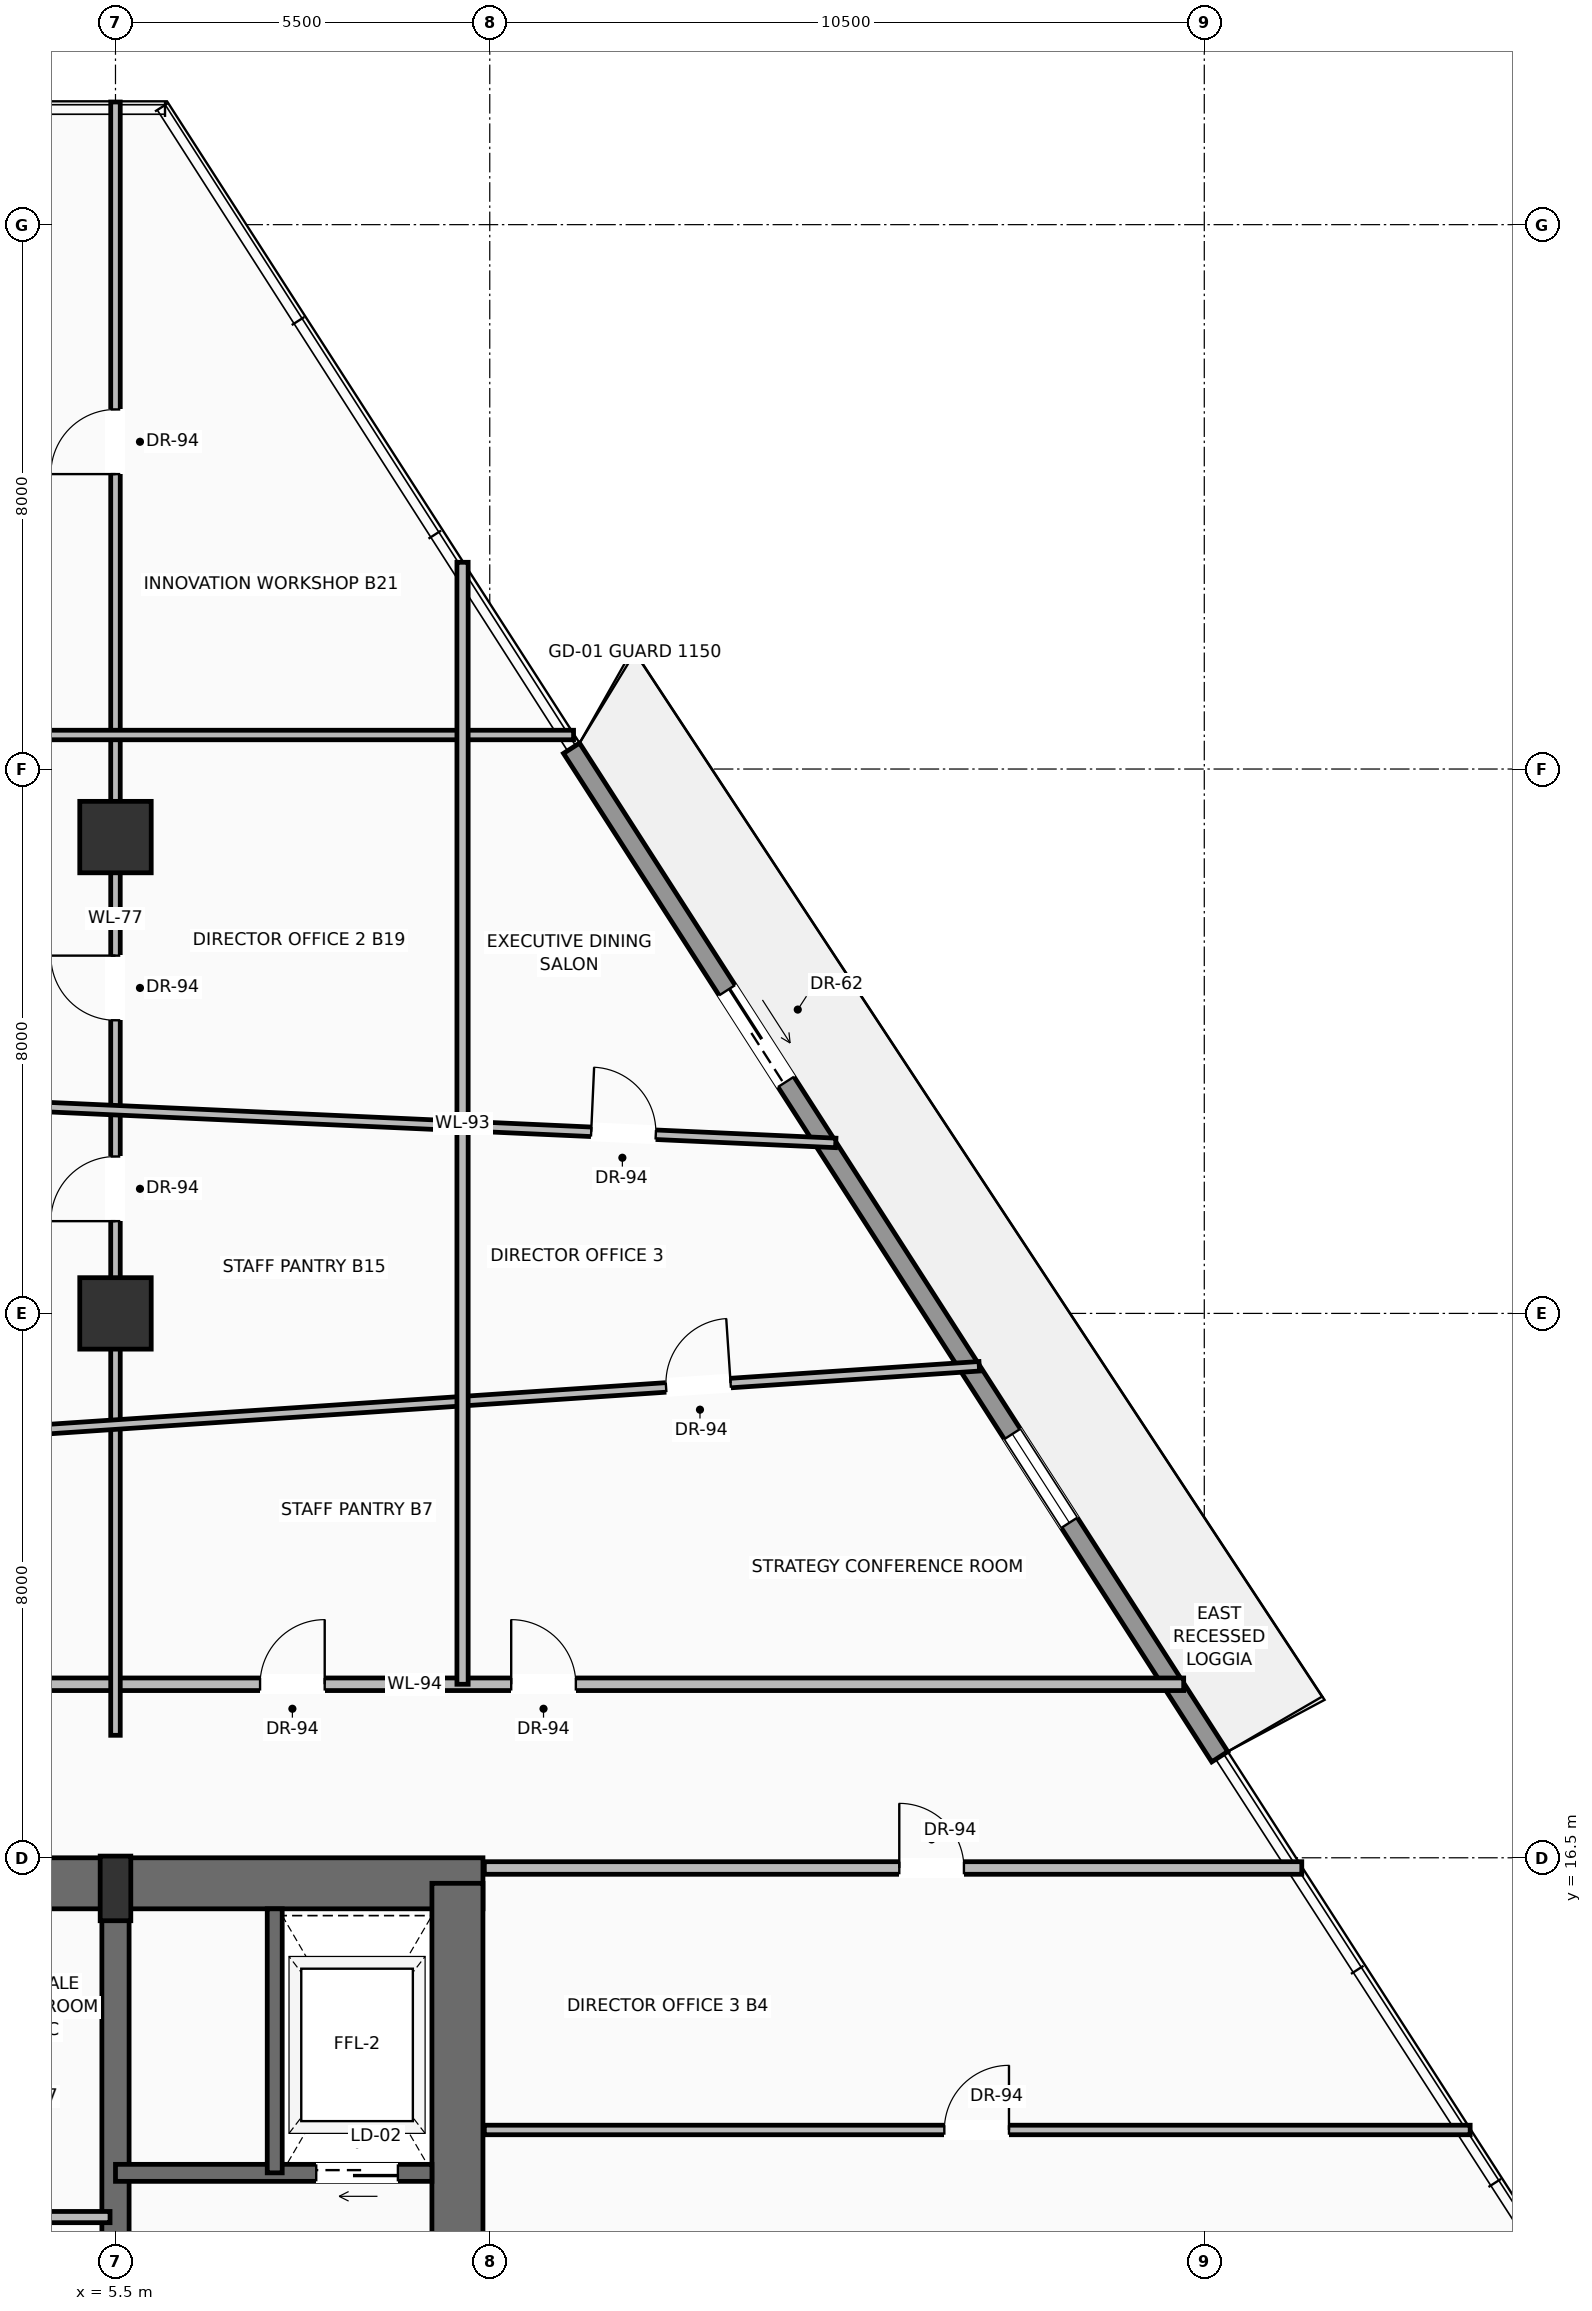
"""IFC4 building model, lengths in metres.
Left out: names, types, materials, properties, quantities, classifications, styles, units other than length and angle.
Written with IfcOpenShell. Run it as: python <this file> out.ifc"""

import sys

from ifc_helpers import new_model, si_unit, direction, frame, frame_2d, origin, origin_2d, place, context, subcontext, project, spatial, rectangle, extrude, source, transform, mapped, element, fill, save


model = new_model("IFC4")
c1 = context("Model", 3, precision=1e-05, world=origin(), true_north=direction((0.0, 1.0)))
c2 = subcontext(c1, "Body", "Model", "MODEL_VIEW")
j1 = project(units=[si_unit("LENGTHUNIT", "METRE"), si_unit("PLANEANGLEUNIT", "RADIAN")], contexts=[c1])
p1 = place(None, origin())
s1 = spatial("IfcSite", under=j1, at=p1, CompositionType="ELEMENT")
p2 = place(p1, origin())
s2 = spatial("IfcBuilding", under=s1, at=p2, CompositionType="ELEMENT")
p3 = place(p2, frame((0.0, 0.0, 109.9)))
s3 = spatial("IfcBuildingStorey", under=s2, at=p3, CompositionType="ELEMENT", Elevation=109.9)
p4 = place(p3, frame((-10.9, 16.125, 0.0), z_axis=(0.0, 0.0, 1.0), x_axis=(1.0, 0.0, 0.0)))
e1 = element("IfcWall", 1, at=p4, inside=s3, PredefinedType="SHEAR", context=c2, shape_type="SweptSolid", body=[
    extrude(rectangle(XDim=21.8, YDim=0.75, at=frame_2d((10.9, 0.0))), origin(), (0.0, 0.0, 1.0), 3.45),
])
p5 = place(p4, frame((3.47, 0.0, 0.0)))
e2 = element("IfcOpeningElement", 2, at=p5, cuts=e1, PredefinedType="OPENING", context=c2, shape_type="SweptSolid", body=[
    extrude(rectangle(XDim=1.3, YDim=2.3, at=frame_2d((0.65, 1.15))), frame((0.0, 0.385, 0.0), z_axis=(0.0, -1.0, 0.0), x_axis=(1.0, 0.0, 0.0)), (0.0, 0.0, 1.0), 0.77),
])
p6 = place(p4, frame((9.9, 0.0, 0.0)))
e3 = element("IfcOpeningElement", 3, at=p6, cuts=e1, PredefinedType="OPENING", context=c2, shape_type="SweptSolid", body=[
    extrude(rectangle(XDim=2.0, YDim=2.4, at=frame_2d((1.0, 1.2))), frame((0.0, 0.385, 0.0), z_axis=(0.0, -1.0, 0.0), x_axis=(1.0, 0.0, 0.0)), (0.0, 0.0, 1.0), 0.77),
])
p7 = place(p3, frame((10.525, 0.475, 0.0), z_axis=(0.0, 0.0, 1.0), x_axis=(0.0, 1.0, 0.0)))
e4 = element("IfcWall", 4, at=p7, inside=s3, PredefinedType="SHEAR", context=c2, shape_type="SweptSolid", body=[
    extrude(rectangle(XDim=15.65, YDim=0.75, at=frame_2d((7.825, 0.0))), origin(), (0.0, 0.0, 1.0), 3.45),
])
p8 = place(p3, frame((5.5, 0.475, 0.0), z_axis=(0.0, 0.0, 1.0), x_axis=(0.0, 1.0, 0.0)))
e5 = element("IfcWall", 5, at=p8, inside=s3, PredefinedType="SHEAR", context=c2, shape_type="SweptSolid", body=[
    extrude(rectangle(XDim=15.65, YDim=0.4, at=frame_2d((7.825, 0.0))), origin(), (0.0, 0.0, 1.0), 3.45),
])
p9 = place(p8, frame((9.025, 0.0, 0.0)))
e6 = element("IfcOpeningElement", 6, at=p9, cuts=e5, PredefinedType="OPENING", context=c2, shape_type="SweptSolid", body=[
    extrude(rectangle(XDim=1.1, YDim=2.2, at=frame_2d((0.55, 1.1))), frame((0.0, 0.21, 0.0), z_axis=(0.0, -1.0, 0.0), x_axis=(1.0, 0.0, 0.0)), (0.0, 0.0, 1.0), 0.42),
])
m1 = source(origin(), c2, "Body", "SweptSolid", [
    extrude(rectangle(XDim=0.45, YDim=0.95, at=origin_2d()), origin(), (0.0, 0.0, 1.0), 3.7),
])
p10 = place(p3, frame((5.5, 16.05, 0.0), z_axis=(0.0, 0.0, 1.0), x_axis=(1.0, 0.0, 0.0)))
e7 = element("IfcColumn", 7, at=p10, inside=s3, PredefinedType="PILASTER", context=c2, shape_type="MappedRepresentation", body=[
    mapped(m1, transform((0.0, 0.0, 0.0), scale=1.0)),
])
m2 = source(origin(), c2, "Body", "SweptSolid", [
    extrude(rectangle(XDim=1.05, YDim=1.05, at=origin_2d()), origin(), (0.0, 0.0, 1.0), 3.7),
])
for number, where, z_axis, x_axis in (
    (8, (5.5, 24.5, 0.0), (0.0, 0.0, 1.0), (1.0, 0.0, 0.0)),
    (9, (5.5, 31.5, 0.0), (0.0, 0.0, 1.0), (1.0, 0.0, 0.0)),
):
    element("IfcColumn", number, at=place(p3, frame(where, z_axis=z_axis, x_axis=x_axis)), inside=s3, PredefinedType="COLUMN", context=c2, shape_type="MappedRepresentation", body=[
        mapped(m2, transform((0.0, 0.0, 0.0), scale=1.0)),
    ])
p11 = place(p3, frame((12.202, 32.806, 0.0), z_axis=(0.0, 0.0, 1.0), x_axis=(0.540666538477, -0.841237002379, 0.0)))
e10 = element("IfcWall", 10, at=p11, inside=s3, PredefinedType="SOLIDWALL", context=c2, shape_type="SweptSolid", body=[
    extrude(rectangle(XDim=17.618, YDim=0.28, at=frame_2d((8.809, 0.0))), origin(), (0.0, 0.0, 1.0), 3.03),
])
p12 = place(p11, frame((4.228, 0.0, 0.0)))
e11 = element("IfcOpeningElement", 11, at=p12, cuts=e10, PredefinedType="OPENING", context=c2, shape_type="SweptSolid", body=[
    extrude(rectangle(XDim=1.6, YDim=2.35, at=frame_2d((0.8, 1.175))), frame((0.0, 0.15, 0.0), z_axis=(0.0, -1.0, 0.0), x_axis=(1.0, 0.0, 0.0)), (0.0, 0.0, 1.0), 0.3),
])
p13 = place(p11, frame((11.98, 0.0, 0.9)))
e12 = element("IfcOpeningElement", 12, at=p13, cuts=e10, PredefinedType="OPENING", context=c2, shape_type="SweptSolid", body=[
    extrude(rectangle(XDim=1.55, YDim=1.85, at=frame_2d((0.775, 0.925))), frame((0.0, 0.15, 0.0), z_axis=(0.0, -1.0, 0.0), x_axis=(1.0, 0.0, 0.0)), (0.0, 0.0, 1.0), 0.3),
])
p14 = place(p3, frame((10.15, 11.87, 0.0), z_axis=(0.0, 0.0, 1.0), x_axis=(-1.0, 0.0, 0.0)))
e13 = element("IfcWall", 13, at=p14, inside=s3, PredefinedType="SOLIDWALL", context=c2, shape_type="SweptSolid", body=[
    extrude(rectangle(XDim=4.65, YDim=0.25, at=frame_2d((2.325, 0.0))), origin(), (0.0, 0.0, 1.0), 3.45),
])
p15 = place(p14, frame((0.5, 0.0, 0.0)))
e14 = element("IfcOpeningElement", 14, at=p15, cuts=e13, PredefinedType="OPENING", context=c2, shape_type="SweptSolid", body=[
    extrude(rectangle(XDim=1.2, YDim=2.25, at=frame_2d((0.6, 1.125))), frame((0.0, 0.135, 0.0), z_axis=(0.0, -1.0, 0.0), x_axis=(1.0, 0.0, 0.0)), (0.0, 0.0, 1.0), 0.27),
])
p16 = place(p3, frame((7.84, 11.87, 0.0), z_axis=(0.0, 0.0, 1.0), x_axis=(0.0, 1.0, 0.0)))
e15 = element("IfcWall", 15, at=p16, inside=s3, PredefinedType="SOLIDWALL", context=c2, shape_type="SweptSolid", body=[
    extrude(rectangle(XDim=3.88, YDim=0.22, at=frame_2d((1.94, 0.0))), origin(), (0.0, 0.0, 1.0), 3.45),
])
p17 = place(p3, frame((3.54, 11.22, 0.0), z_axis=(0.0, 0.0, 1.0), x_axis=(1.0, 0.0, 0.0)))
e16 = element("IfcWall", 16, at=p17, inside=s3, PredefinedType="PARTITIONING", context=c2, shape_type="SweptSolid", body=[
    extrude(rectangle(XDim=1.88, YDim=0.165, at=frame_2d((0.94, 0.0))), origin(), (0.0, 0.0, 1.0), 3.442),
])
p18 = place(p3, frame((10.92, 16.35, 0.0), z_axis=(0.0, 0.0, 1.0), x_axis=(1.0, 0.0, 0.0)))
e17 = element("IfcWall", 17, at=p18, inside=s3, PredefinedType="PARTITIONING", context=c2, shape_type="SweptSolid", body=[
    extrude(rectangle(XDim=12.013, YDim=0.185, at=frame_2d((6.006, 0.0))), origin(), (0.0, 0.0, 1.0), 2.747),
])
p19 = place(p18, frame((6.098, 0.0, 0.0)))
e18 = element("IfcOpeningElement", 18, at=p19, cuts=e17, PredefinedType="OPENING", context=c2, shape_type="SweptSolid", body=[
    extrude(rectangle(XDim=0.95, YDim=2.2, at=frame_2d((0.475, 1.1))), frame((0.0, 0.103, 0.0), z_axis=(0.0, -1.0, 0.0), x_axis=(1.0, 0.0, 0.0)), (0.0, 0.0, 1.0), 0.205),
])
p20 = place(p3, frame((-1.4, 19.05, 0.0), z_axis=(0.0, 0.0, 1.0), x_axis=(1.0, 0.0, 0.0)))
e19 = element("IfcWall", 19, at=p20, inside=s3, PredefinedType="PARTITIONING", context=c2, shape_type="SweptSolid", body=[
    extrude(rectangle(XDim=22.597, YDim=0.185, at=frame_2d((11.299, 0.0))), origin(), (0.0, 0.0, 1.0), 2.747),
])
p21 = place(p20, frame((12.715, 0.0, 0.0)))
e20 = element("IfcOpeningElement", 20, at=p21, cuts=e19, PredefinedType="OPENING", context=c2, shape_type="SweptSolid", body=[
    extrude(rectangle(XDim=0.95, YDim=2.2, at=frame_2d((0.475, 1.1))), frame((0.0, 0.103, 0.0), z_axis=(0.0, -1.0, 0.0), x_axis=(1.0, 0.0, 0.0)), (0.0, 0.0, 1.0), 0.205),
])
p22 = place(p20, frame((3.365, 0.0, 0.0)))
e21 = element("IfcOpeningElement", 21, at=p22, cuts=e19, PredefinedType="OPENING", context=c2, shape_type="SweptSolid", body=[
    extrude(rectangle(XDim=0.95, YDim=2.2, at=frame_2d((0.475, 1.1))), frame((0.0, 0.103, 0.0), z_axis=(0.0, -1.0, 0.0), x_axis=(1.0, 0.0, 0.0)), (0.0, 0.0, 1.0), 0.205),
])
p23 = place(p20, frame((9.025, 0.0, 0.0)))
e22 = element("IfcOpeningElement", 22, at=p23, cuts=e19, PredefinedType="OPENING", context=c2, shape_type="SweptSolid", body=[
    extrude(rectangle(XDim=0.95, YDim=2.2, at=frame_2d((0.475, 1.1))), frame((0.0, 0.103, 0.0), z_axis=(0.0, -1.0, 0.0), x_axis=(1.0, 0.0, 0.0)), (0.0, 0.0, 1.0), 0.205),
])
p24 = place(p3, frame((5.5, 18.3, 0.0), z_axis=(0.0, 0.0, 1.0), x_axis=(0.0, 1.0, 0.0)))
e23 = element("IfcWall", 23, at=p24, inside=s3, PredefinedType="PARTITIONING", context=c2, shape_type="SweptSolid", body=[
    extrude(rectangle(XDim=24.002, YDim=0.14, at=frame_2d((12.001, 0.0))), origin(), (0.0, 0.0, 1.0), 2.747),
])
p25 = place(p24, frame((10.508, 0.0, 0.0)))
e24 = element("IfcOpeningElement", 24, at=p25, cuts=e23, PredefinedType="OPENING", context=c2, shape_type="SweptSolid", body=[
    extrude(rectangle(XDim=0.95, YDim=2.2, at=frame_2d((0.475, 1.1))), frame((0.0, 0.08, 0.0), z_axis=(0.0, -1.0, 0.0), x_axis=(1.0, 0.0, 0.0)), (0.0, 0.0, 1.0), 0.16),
])
p26 = place(p24, frame((18.534, 0.0, 0.0)))
e25 = element("IfcOpeningElement", 25, at=p26, cuts=e23, PredefinedType="OPENING", context=c2, shape_type="SweptSolid", body=[
    extrude(rectangle(XDim=0.95, YDim=2.2, at=frame_2d((0.475, 1.1))), frame((0.0, 0.08, 0.0), z_axis=(0.0, -1.0, 0.0), x_axis=(1.0, 0.0, 0.0)), (0.0, 0.0, 1.0), 0.16),
])
p27 = place(p24, frame((7.556, 0.0, 0.0)))
e26 = element("IfcOpeningElement", 26, at=p27, cuts=e23, PredefinedType="OPENING", context=c2, shape_type="SweptSolid", body=[
    extrude(rectangle(XDim=0.95, YDim=2.2, at=frame_2d((0.475, 1.1))), frame((0.0, 0.08, 0.0), z_axis=(0.0, -1.0, 0.0), x_axis=(1.0, 0.0, 0.0)), (0.0, 0.0, 1.0), 0.16),
])
p28 = place(p3, frame((-1.4, 22.4, 0.0), z_axis=(0.0, 0.0, 1.0), x_axis=(0.997727357644, 0.067380411165, 0.0)))
e27 = element("IfcWall", 27, at=p28, inside=s3, PredefinedType="PARTITIONING", context=c2, shape_type="SweptSolid", body=[
    extrude(rectangle(XDim=19.638, YDim=0.14, at=frame_2d((9.819, 0.0))), origin(), (0.0, 0.0, 1.0), 2.747),
])
p29 = place(p28, frame((15.025, 0.0, 0.0)))
e28 = element("IfcOpeningElement", 28, at=p29, cuts=e27, PredefinedType="OPENING", context=c2, shape_type="SweptSolid", body=[
    extrude(rectangle(XDim=0.95, YDim=2.2, at=frame_2d((0.475, 1.1))), frame((0.0, 0.08, 0.0), z_axis=(0.0, -1.0, 0.0), x_axis=(1.0, 0.0, 0.0)), (0.0, 0.0, 1.0), 0.16),
])
p30 = place(p3, frame((-1.4, 27.8, 0.0), z_axis=(0.0, 0.0, 1.0), x_axis=(0.998969316616, -0.045390576782, 0.0)))
e29 = element("IfcWall", 29, at=p30, inside=s3, PredefinedType="PARTITIONING", context=c2, shape_type="SweptSolid", body=[
    extrude(rectangle(XDim=17.502, YDim=0.14, at=frame_2d((8.751, 0.0))), origin(), (0.0, 0.0, 1.0), 2.747),
])
p31 = place(p30, frame((13.905, 0.0, 0.0)))
e30 = element("IfcOpeningElement", 30, at=p31, cuts=e29, PredefinedType="OPENING", context=c2, shape_type="SweptSolid", body=[
    extrude(rectangle(XDim=0.95, YDim=2.2, at=frame_2d((0.475, 1.1))), frame((0.0, 0.08, 0.0), z_axis=(0.0, -1.0, 0.0), x_axis=(1.0, 0.0, 0.0)), (0.0, 0.0, 1.0), 0.16),
])
p32 = place(p3, frame((-1.4, 33.0, 0.0), z_axis=(0.0, 0.0, 1.0), x_axis=(1.0, 0.0, 0.0)))
e31 = element("IfcWall", 31, at=p32, inside=s3, PredefinedType="PARTITIONING", context=c2, shape_type="SweptSolid", body=[
    extrude(rectangle(XDim=13.631, YDim=0.14, at=frame_2d((6.816, 0.0))), origin(), (0.0, 0.0, 1.0), 2.747),
])
p33 = place(p3, frame((10.6, 19.05, 0.0), z_axis=(0.0, 0.0, 1.0), x_axis=(0.0, 1.0, 0.0)))
e32 = element("IfcWall", 32, at=p33, inside=s3, PredefinedType="PARTITIONING", context=c2, shape_type="SweptSolid", body=[
    extrude(rectangle(XDim=16.488, YDim=0.165, at=frame_2d((8.244, 0.0))), origin(), (0.0, 0.0, 1.0), 2.747),
])
p34 = place(p3, frame((10.92, 12.5, 0.0), z_axis=(0.0, 0.0, 1.0), x_axis=(1.0, 0.0, 0.0)))
e33 = element("IfcWall", 33, at=p34, inside=s3, PredefinedType="PARTITIONING", context=c2, shape_type="SweptSolid", body=[
    extrude(rectangle(XDim=14.487, YDim=0.14, at=frame_2d((7.244, 0.0))), origin(), (0.0, 0.0, 1.0), 3.442),
])
p35 = place(p34, frame((6.76, 0.0, 0.0)))
e34 = element("IfcOpeningElement", 34, at=p35, cuts=e33, PredefinedType="OPENING", context=c2, shape_type="SweptSolid", body=[
    extrude(rectangle(XDim=0.95, YDim=2.2, at=frame_2d((0.475, 1.1))), frame((0.0, 0.08, 0.0), z_axis=(0.0, -1.0, 0.0), x_axis=(1.0, 0.0, 0.0)), (0.0, 0.0, 1.0), 0.16),
])
m3 = source(origin(), c2, "Body", "SweptSolid", [
    extrude(rectangle(XDim=1.6, YDim=2.35, at=frame_2d((0.8, 1.175))), frame((0.0, 0.025, 0.0), z_axis=(0.0, -1.0, 0.0), x_axis=(1.0, 0.0, 0.0)), (0.0, 0.0, 1.0), 0.05),
])
p36 = place(p12, origin())
e35 = element("IfcDoor", 35, at=p36, inside=s3, OperationType="SLIDING_TO_RIGHT", PredefinedType="DOOR", context=c2, shape_type="MappedRepresentation", body=[
    mapped(m3, transform((0.0, 0.0, 0.0), scale=1.0)),
])
fill(e11, e35)
m4 = source(origin(), c2, "Body", "SweptSolid", [
    extrude(rectangle(XDim=1.55, YDim=1.85, at=frame_2d((0.775, 0.925))), frame((0.0, 0.03, 0.0), z_axis=(0.0, -1.0, 0.0), x_axis=(1.0, 0.0, 0.0)), (0.0, 0.0, 1.0), 0.06),
])
p37 = place(p13, origin())
e36 = element("IfcWindow", 36, at=p37, inside=s3, PartitioningType="SINGLE_PANEL", PredefinedType="WINDOW", context=c2, shape_type="MappedRepresentation", body=[
    mapped(m4, transform((0.0, 0.0, 0.0), scale=1.0)),
])
fill(e12, e36)
m5 = source(origin(), c2, "Body", "SweptSolid", [
    extrude(rectangle(XDim=1.2, YDim=2.25, at=frame_2d((0.6, 1.125))), frame((0.0, 0.025, 0.0), z_axis=(0.0, -1.0, 0.0), x_axis=(1.0, 0.0, 0.0)), (0.0, 0.0, 1.0), 0.05),
])
p38 = place(p15, origin())
e37 = element("IfcDoor", 37, at=p38, inside=s3, OperationType="SLIDING_TO_RIGHT", PredefinedType="DOOR", context=c2, shape_type="MappedRepresentation", body=[
    mapped(m5, transform((0.0, 0.0, 0.0), scale=1.0)),
])
fill(e14, e37)
m6 = source(origin(), c2, "Body", "SweptSolid", [
    extrude(rectangle(XDim=0.95, YDim=2.2, at=frame_2d((0.475, 1.1))), frame((0.0, 0.025, 0.0), z_axis=(0.0, -1.0, 0.0), x_axis=(1.0, 0.0, 0.0)), (0.0, 0.0, 1.0), 0.05),
])
p39 = place(p19, origin())
e38 = element("IfcDoor", 38, at=p39, inside=s3, OperationType="SINGLE_SWING_LEFT", PredefinedType="DOOR", context=c2, shape_type="MappedRepresentation", body=[
    mapped(m6, transform((0.0, 0.0, 0.0), scale=1.0)),
])
fill(e18, e38)
p40 = place(p21, origin())
e39 = element("IfcDoor", 39, at=p40, inside=s3, OperationType="SINGLE_SWING_LEFT", PredefinedType="DOOR", context=c2, shape_type="MappedRepresentation", body=[
    mapped(m6, transform((0.0, 0.0, 0.0), scale=1.0)),
])
fill(e20, e39)
p41 = place(p35, origin())
e40 = element("IfcDoor", 40, at=p41, inside=s3, OperationType="SINGLE_SWING_RIGHT", PredefinedType="DOOR", context=c2, shape_type="MappedRepresentation", body=[
    mapped(m6, transform((0.0, 0.0, 0.0), scale=1.0)),
])
fill(e34, e40)
p42 = place(p23, origin())
e41 = element("IfcDoor", 41, at=p42, inside=s3, OperationType="SINGLE_SWING_RIGHT", PredefinedType="DOOR", context=c2, shape_type="MappedRepresentation", body=[
    mapped(m6, transform((0.0, 0.0, 0.0), scale=1.0)),
])
fill(e22, e41)
p43 = place(p29, origin())
e42 = element("IfcDoor", 42, at=p43, inside=s3, OperationType="SINGLE_SWING_RIGHT", PredefinedType="DOOR", context=c2, shape_type="MappedRepresentation", body=[
    mapped(m6, transform((0.0, 0.0, 0.0), scale=1.0)),
])
fill(e28, e42)
p44 = place(p25, origin())
e43 = element("IfcDoor", 43, at=p44, inside=s3, OperationType="SINGLE_SWING_RIGHT", PredefinedType="DOOR", context=c2, shape_type="MappedRepresentation", body=[
    mapped(m6, transform((0.0, 0.0, 0.0), scale=1.0)),
])
fill(e24, e43)
p45 = place(p26, origin())
e44 = element("IfcDoor", 44, at=p45, inside=s3, OperationType="SINGLE_SWING_LEFT", PredefinedType="DOOR", context=c2, shape_type="MappedRepresentation", body=[
    mapped(m6, transform((0.0, 0.0, 0.0), scale=1.0)),
])
fill(e25, e44)
p46 = place(p27, origin())
e45 = element("IfcDoor", 45, at=p46, inside=s3, OperationType="SINGLE_SWING_LEFT", PredefinedType="DOOR", context=c2, shape_type="MappedRepresentation", body=[
    mapped(m6, transform((0.0, 0.0, 0.0), scale=1.0)),
])
fill(e26, e45)
p47 = place(p31, origin())
e46 = element("IfcDoor", 46, at=p47, inside=s3, OperationType="SINGLE_SWING_LEFT", PredefinedType="DOOR", context=c2, shape_type="MappedRepresentation", body=[
    mapped(m6, transform((0.0, 0.0, 0.0), scale=1.0)),
])
fill(e30, e46)
save(model, sys.argv[1])
